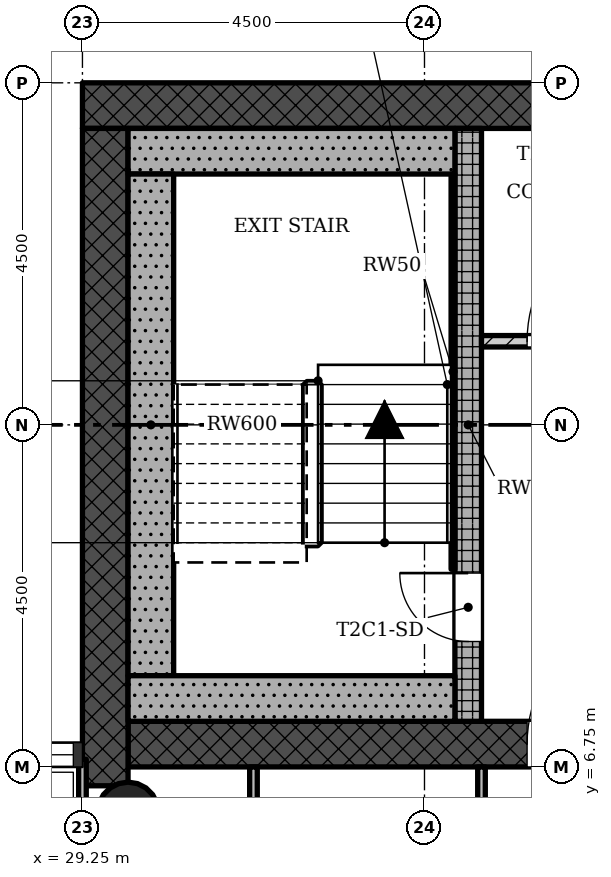
"""IFC4 building model, lengths in metres.
Left out: names, types, materials, properties, quantities, classifications, styles, units other than length and angle.
Written with IfcOpenShell. Run it as: python <this file> out.ifc"""

import sys

from ifc_helpers import new_model, si_unit, direction, frame, frame_2d, origin, origin_2d, place, context, subcontext, project, spatial, rectangle, hollow_circle, extrude, element, fill, save


model = new_model("IFC4")
c1 = context("Model", 3, precision=1e-05, world=origin(), true_north=direction((0.0, 1.0)))
c2 = subcontext(c1, "Body", "Model", "MODEL_VIEW")
j1 = project(units=[si_unit("LENGTHUNIT", "METRE"), si_unit("PLANEANGLEUNIT", "RADIAN")], contexts=[c1])
p1 = place(None, origin())
s1 = spatial("IfcSite", under=j1, at=p1, CompositionType="ELEMENT")
p2 = place(p1, origin())
s2 = spatial("IfcBuilding", under=s1, at=p2, CompositionType="ELEMENT")
p3 = place(p2, frame((0.0, 0.0, 189.2)))
s3 = spatial("IfcBuildingStorey", under=s2, at=p3, CompositionType="ELEMENT", Elevation=189.2)
p4 = place(p3, frame((29.85, 7.05, 0.0), z_axis=(0.0, 0.0, 1.0), x_axis=(1.0, 0.0, 0.0)))
e1 = element("IfcWall", 1, at=p4, inside=s3, PredefinedType="SHEAR", context=c2, shape_type="SweptSolid", body=[
    extrude(rectangle(XDim=12.9, YDim=0.6, at=frame_2d((6.45, 0.0))), origin(), (0.0, 0.0, 1.0), 3.4),
])
p5 = place(p4, frame((5.25, 0.0, 0.0)))
e2 = element("IfcOpeningElement", 2, at=p5, cuts=e1, PredefinedType="OPENING", context=c2, shape_type="SweptSolid", body=[
    extrude(rectangle(XDim=1.8, YDim=2.1, at=frame_2d((0.9, 1.05))), frame((0.0, 0.31, 0.0), z_axis=(0.0, -1.0, 0.0), x_axis=(1.0, 0.0, 0.0)), (0.0, 0.0, 1.0), 0.62),
])
p6 = place(p3, frame((42.15, 15.45, 0.0), z_axis=(0.0, 0.0, 1.0), x_axis=(-1.0, 0.0, 0.0)))
e3 = element("IfcWall", 3, at=p6, inside=s3, PredefinedType="SHEAR", context=c2, shape_type="SweptSolid", body=[
    extrude(rectangle(XDim=12.9, YDim=0.6, at=frame_2d((6.45, 0.0))), origin(), (0.0, 0.0, 1.0), 3.4),
])
p7 = place(p6, frame((5.7, 0.0, 0.45)))
e4 = element("IfcOpeningElement", 4, at=p7, cuts=e3, PredefinedType="OPENING", context=c2, shape_type="SweptSolid", body=[
    extrude(rectangle(XDim=0.9, YDim=2.4, at=frame_2d((0.45, 1.2))), frame((0.0, 0.31, 0.0), z_axis=(0.0, -1.0, 0.0), x_axis=(1.0, 0.0, 0.0)), (0.0, 0.0, 1.0), 0.62),
])
p8 = place(p3, frame((29.55, 15.15, 0.0), z_axis=(0.0, 0.0, 1.0), x_axis=(0.0, -1.0, 0.0)))
e5 = element("IfcWall", 5, at=p8, inside=s3, PredefinedType="SHEAR", context=c2, shape_type="SweptSolid", body=[
    extrude(rectangle(XDim=8.648, YDim=0.6, at=frame_2d((4.324, 0.0))), origin(), (0.0, 0.0, 1.0), 3.4),
])
p9 = place(p3, frame((34.325, 7.35, 0.0), z_axis=(0.0, 0.0, 1.0), x_axis=(0.0, 1.0, 0.0)))
e6 = element("IfcWall", 6, at=p9, inside=s3, PredefinedType="SHEAR", context=c2, shape_type="SweptSolid", body=[
    extrude(rectangle(XDim=7.8, YDim=0.35, at=frame_2d((3.9, 0.0))), origin(), (0.0, 0.0, 1.0), 3.4),
])
p10 = place(p9, frame((1.05, 0.0, 0.0)))
e7 = element("IfcOpeningElement", 7, at=p10, cuts=e6, PredefinedType="OPENING", context=c2, shape_type="SweptSolid", body=[
    extrude(rectangle(XDim=0.9, YDim=2.1, at=frame_2d((0.45, 1.05))), frame((0.0, 0.185, 0.0), z_axis=(0.0, -1.0, 0.0), x_axis=(1.0, 0.0, 0.0)), (0.0, 0.0, 1.0), 0.37),
])
p11 = place(p3, frame((29.85, 6.15, 0.0), z_axis=(0.0, 0.0, 1.0), x_axis=(1.0, 0.0, 0.0)))
e8 = element("IfcColumn", 8, at=p11, inside=s3, PredefinedType="COLUMN", context=c2, shape_type="SweptSolid", body=[
    extrude(hollow_circle(Radius=0.4, WallThickness=0.028, at=origin_2d()), origin(), (0.0, 0.0, 1.0), 3.4),
])
p12 = place(p3, frame((37.5, 12.35, 0.0), z_axis=(0.0, 0.0, 1.0), x_axis=(-1.0, 0.0, 0.0)))
e9 = element("IfcWall", 9, at=p12, inside=s3, PredefinedType="PARTITIONING", context=c2, shape_type="SweptSolid", body=[
    extrude(rectangle(XDim=3.0, YDim=0.15, at=frame_2d((1.5, 0.0))), origin(), (0.0, 0.0, 1.0), 3.0),
])
p13 = place(p12, frame((0.6, 0.0, 0.0)))
e10 = element("IfcOpeningElement", 10, at=p13, cuts=e9, PredefinedType="OPENING", context=c2, shape_type="SweptSolid", body=[
    extrude(rectangle(XDim=1.8, YDim=2.1, at=frame_2d((0.9, 1.05))), frame((0.0, 0.085, 0.0), z_axis=(0.0, -1.0, 0.0), x_axis=(1.0, 0.0, 0.0)), (0.0, 0.0, 1.0), 0.17),
])
p14 = place(p3, frame((34.5, 4.5, 0.0), z_axis=(0.0, 0.0, 1.0), x_axis=(0.0, 1.0, 0.0)))
e11 = element("IfcWall", 11, at=p14, inside=s3, PredefinedType="PARTITIONING", context=c2, shape_type="SweptSolid", body=[
    extrude(rectangle(XDim=2.25, YDim=0.1, at=frame_2d((1.125, 0.0))), origin(), (0.0, 0.0, 1.0), 3.0),
])
p15 = place(p3, frame((31.5, 0.9, 0.0), z_axis=(0.0, 0.0, 1.0), x_axis=(0.0, 1.0, 0.0)))
e12 = element("IfcWall", 12, at=p15, inside=s3, PredefinedType="PARTITIONING", context=c2, shape_type="SweptSolid", body=[
    extrude(rectangle(XDim=5.85, YDim=0.1, at=frame_2d((2.925, 0.0))), origin(), (0.0, 0.0, 1.0), 3.0),
])
p16 = place(p15, frame((1.35, 0.0, 0.0)))
e13 = element("IfcOpeningElement", 13, at=p16, cuts=e12, PredefinedType="OPENING", context=c2, shape_type="SweptSolid", body=[
    extrude(rectangle(XDim=0.9, YDim=2.1, at=frame_2d((0.45, 1.05))), frame((0.0, 0.06, 0.0), z_axis=(0.0, -1.0, 0.0), x_axis=(1.0, 0.0, 0.0)), (0.0, 0.0, 1.0), 0.12),
])
p17 = place(p3, frame((29.25, 0.9, 0.0), z_axis=(0.0, 0.0, 1.0), x_axis=(0.0, 1.0, 0.0)))
e14 = element("IfcWall", 14, at=p17, inside=s3, PredefinedType="PARTITIONING", context=c2, shape_type="SweptSolid", body=[
    extrude(rectangle(XDim=5.95, YDim=0.1, at=frame_2d((2.975, 0.0))), origin(), (0.0, 0.0, 1.0), 3.0),
])
p18 = place(p3, frame((34.15, 14.85, 0.0), z_axis=(0.0, 0.0, 1.0), x_axis=(-1.0, 0.0, 0.0)))
e15 = element("IfcWall", 15, at=p18, inside=s3, PredefinedType="SHEAR", context=c2, shape_type="SweptSolid", body=[
    extrude(rectangle(XDim=4.3, YDim=0.6, at=frame_2d((2.15, 0.0))), origin(), (0.0, 0.0, 1.0), 3.4),
])
p19 = place(p3, frame((30.15, 7.95, 0.0), z_axis=(0.0, 0.0, 1.0), x_axis=(0.0, 1.0, 0.0)))
e16 = element("IfcWall", 16, at=p19, inside=s3, PredefinedType="SHEAR", context=c2, shape_type="SweptSolid", body=[
    extrude(rectangle(XDim=6.6, YDim=0.6, at=frame_2d((3.3, 0.0))), origin(), (0.0, 0.0, 1.0), 3.4),
])
p20 = place(p3, frame((34.15, 7.65, 0.0), z_axis=(0.0, 0.0, 1.0), x_axis=(-1.0, 0.0, 0.0)))
e17 = element("IfcWall", 17, at=p20, inside=s3, PredefinedType="SHEAR", context=c2, shape_type="SweptSolid", body=[
    extrude(rectangle(XDim=4.3, YDim=0.6, at=frame_2d((2.15, 0.0))), origin(), (0.0, 0.0, 1.0), 3.4),
])
p21 = place(p3, frame((34.125, 9.35, 0.0), z_axis=(0.0, 0.0, 1.0), x_axis=(0.0, 1.0, 0.0)))
e18 = element("IfcWall", 18, at=p21, inside=s3, PredefinedType="SHEAR", context=c2, shape_type="SweptSolid", body=[
    extrude(rectangle(XDim=5.2, YDim=0.05, at=frame_2d((2.6, 0.0))), origin(), (0.0, 0.0, 1.0), 3.4),
])
p22 = place(p13, origin())
e19 = element("IfcDoor", 19, at=p22, inside=s3, OperationType="SINGLE_SWING_LEFT", PredefinedType="DOOR", context=c2, shape_type="SweptSolid", body=[
    extrude(rectangle(XDim=1.8, YDim=2.1, at=frame_2d((0.9, 1.05))), frame((0.0, 0.025, 0.0), z_axis=(0.0, -1.0, 0.0), x_axis=(1.0, 0.0, 0.0)), (0.0, 0.0, 1.0), 0.05),
])
fill(e10, e19)
p23 = place(p10, origin())
e20 = element("IfcDoor", 20, at=p23, inside=s3, OperationType="SINGLE_SWING_LEFT", PredefinedType="DOOR", context=c2, shape_type="SweptSolid", body=[
    extrude(rectangle(XDim=0.9, YDim=2.1, at=frame_2d((0.45, 1.05))), frame((0.0, 0.025, 0.0), z_axis=(0.0, -1.0, 0.0), x_axis=(1.0, 0.0, 0.0)), (0.0, 0.0, 1.0), 0.05),
])
fill(e7, e20)
p24 = place(p5, origin())
e21 = element("IfcDoor", 21, at=p24, inside=s3, OperationType="SINGLE_SWING_LEFT", PredefinedType="DOOR", context=c2, shape_type="SweptSolid", body=[
    extrude(rectangle(XDim=1.8, YDim=2.1, at=frame_2d((0.9, 1.05))), frame((0.0, 0.025, 0.0), z_axis=(0.0, -1.0, 0.0), x_axis=(1.0, 0.0, 0.0)), (0.0, 0.0, 1.0), 0.05),
])
fill(e2, e21)
save(model, sys.argv[1])
